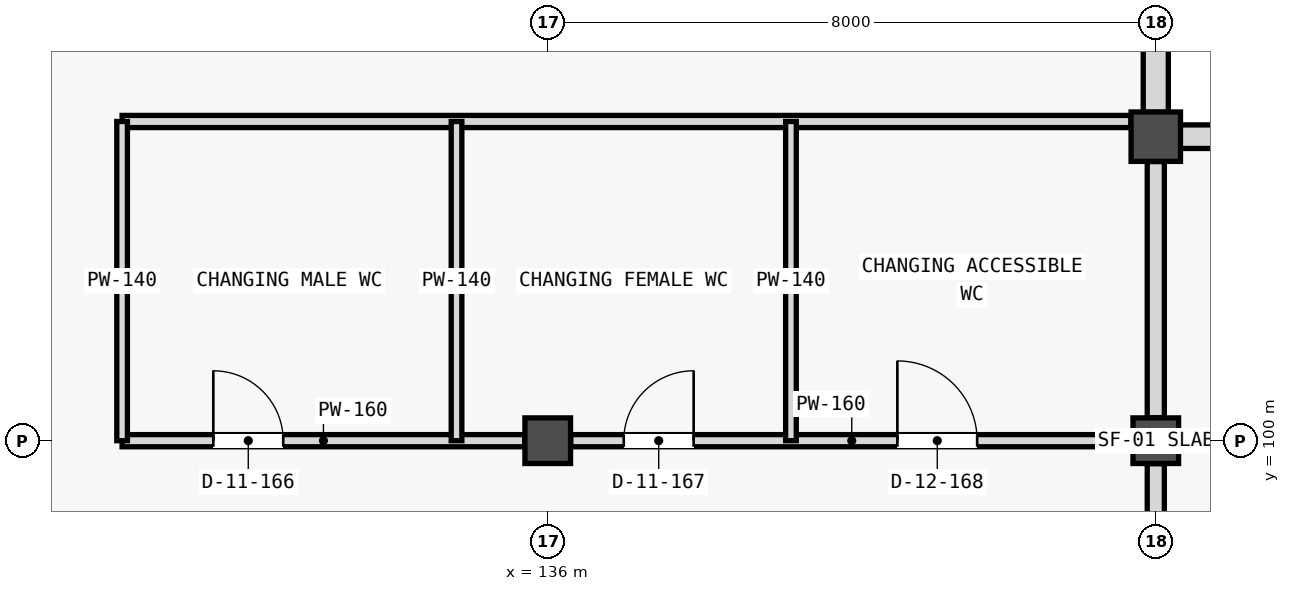
"""IFC4 building model, lengths in metres.
Left out: names, types, materials, properties, quantities, classifications, styles, units other than length and angle.
Written with IfcOpenShell. Run it as: python <this file> out.ifc"""

import sys

from ifc_helpers import new_model, si_unit, direction, frame, frame_2d, origin, origin_2d, place, context, subcontext, project, spatial, rectangle, extrude, element, fill, save


model = new_model("IFC4")
c1 = context("Model", 3, precision=1e-05, world=origin(), true_north=direction((0.0, 1.0)))
c2 = subcontext(c1, "Body", "Model", "MODEL_VIEW")
j1 = project(units=[si_unit("LENGTHUNIT", "METRE"), si_unit("PLANEANGLEUNIT", "RADIAN")], contexts=[c1])
p1 = place(None, origin())
s1 = spatial("IfcSite", under=j1, at=p1, CompositionType="ELEMENT")
p2 = place(p1, origin())
s2 = spatial("IfcBuilding", under=s1, at=p2, CompositionType="ELEMENT")
p3 = place(p2, origin())
s3 = spatial("IfcBuildingStorey", under=s2, at=p3, CompositionType="ELEMENT", Elevation=0.0)
for number, where, z_axis, x_axis in (
    (1, (136.0, 100.0, 0.0), (0.0, 0.0, 1.0), (1.0, 0.0, 0.0)),
    (2, (144.0, 100.0, 0.0), (0.0, 0.0, 1.0), (1.0, 0.0, 0.0)),
):
    element("IfcColumn", number, at=place(p3, frame(where, z_axis=z_axis, x_axis=x_axis)), inside=s3, PredefinedType="COLUMN", context=c2, shape_type="SweptSolid", body=[
        extrude(rectangle(XDim=0.6, YDim=0.6, at=origin_2d()), origin(), (0.0, 0.0, 1.0), 5.125),
    ])
p4 = place(p3, frame((144.0, 104.0, 0.0), z_axis=(0.0, 0.0, 1.0), x_axis=(1.0, 0.0, 0.0)))
e3 = element("IfcColumn", 3, at=p4, inside=s3, PredefinedType="COLUMN", context=c2, shape_type="SweptSolid", body=[
    extrude(rectangle(XDim=0.65, YDim=0.65, at=origin_2d()), origin(), (0.0, 0.0, 1.0), 5.125),
])
p5 = place(p3, frame((144.0, 104.321, 0.0), z_axis=(0.0, 0.0, 1.0), x_axis=(0.0, 1.0, 0.0)))
e4 = element("IfcWall", 4, at=p5, inside=s3, PredefinedType="STANDARD", context=c2, shape_type="SweptSolid", body=[
    extrude(rectangle(XDim=3.383, YDim=0.33, at=frame_2d((1.691, 0.0))), origin(), (0.0, 0.0, 1.0), 4.45),
])
p6 = place(p3, frame((144.321, 104.0, 0.0), z_axis=(0.0, 0.0, 1.0), x_axis=(1.0, 0.0, 0.0)))
e5 = element("IfcWall", 5, at=p6, inside=s3, PredefinedType="STANDARD", context=c2, shape_type="SweptSolid", body=[
    extrude(rectangle(XDim=7.358, YDim=0.31, at=frame_2d((3.679, 0.0))), origin(), (0.0, 0.0, 1.0), 4.25),
])
p7 = place(p6, frame((3.029, 0.0, 0.95)))
e6 = element("IfcOpeningElement", 6, at=p7, cuts=e5, PredefinedType="OPENING", context=c2, shape_type="SweptSolid", body=[
    extrude(rectangle(XDim=1.3, YDim=1.4, at=frame_2d((0.65, 0.7))), frame((0.0, 0.165, 0.0), z_axis=(0.0, -1.0, 0.0), x_axis=(1.0, 0.0, 0.0)), (0.0, 0.0, 1.0), 0.33),
])
for number, where, z_axis, x_axis in (
    (7, (144.0, 96.327, 0.0), (0.0, 0.0, 1.0), (0.0, 1.0, 0.0)),
    (8, (144.0, 100.302, 0.0), (0.0, 0.0, 1.0), (0.0, 1.0, 0.0)),
):
    element("IfcWall", number, at=place(p3, frame(where, z_axis=z_axis, x_axis=x_axis)), inside=s3, PredefinedType="STANDARD", context=c2, shape_type="SweptSolid", body=[
        extrude(rectangle(XDim=3.371, YDim=0.225, at=frame_2d((1.686, 0.0))), origin(), (0.0, 0.0, 1.0), 4.555),
    ])
p8 = place(p3, frame((130.4, 100.0, 0.0), z_axis=(0.0, 0.0, 1.0), x_axis=(1.0, 0.0, 0.0)))
e9 = element("IfcWall", 9, at=p8, inside=s3, PredefinedType="PARTITIONING", context=c2, shape_type="SweptSolid", body=[
    extrude(rectangle(XDim=5.298, YDim=0.16, at=frame_2d((2.649, 0.0))), origin(), (0.0, 0.0, 1.0), 4.355),
])
p9 = place(p8, frame((1.2, 0.0, 0.0)))
e10 = element("IfcOpeningElement", 10, at=p9, cuts=e9, PredefinedType="OPENING", context=c2, shape_type="SweptSolid", body=[
    extrude(rectangle(XDim=0.92, YDim=2.1, at=frame_2d((0.46, 1.05))), frame((0.0, 0.09, 0.0), z_axis=(0.0, -1.0, 0.0), x_axis=(1.0, 0.0, 0.0)), (0.0, 0.0, 1.0), 0.18),
])
p10 = place(p3, frame((136.302, 100.0, 0.0), z_axis=(0.0, 0.0, 1.0), x_axis=(1.0, 0.0, 0.0)))
e11 = element("IfcWall", 11, at=p10, inside=s3, PredefinedType="PARTITIONING", context=c2, shape_type="SweptSolid", body=[
    extrude(rectangle(XDim=7.396, YDim=0.16, at=frame_2d((3.698, 0.0))), origin(), (0.0, 0.0, 1.0), 4.355),
])
p11 = place(p10, frame((0.698, 0.0, 0.0)))
e12 = element("IfcOpeningElement", 12, at=p11, cuts=e11, PredefinedType="OPENING", context=c2, shape_type="SweptSolid", body=[
    extrude(rectangle(XDim=0.92, YDim=2.1, at=frame_2d((0.46, 1.05))), frame((0.0, 0.09, 0.0), z_axis=(0.0, -1.0, 0.0), x_axis=(1.0, 0.0, 0.0)), (0.0, 0.0, 1.0), 0.18),
])
p12 = place(p10, frame((4.298, 0.0, 0.0)))
e13 = element("IfcOpeningElement", 13, at=p12, cuts=e11, PredefinedType="OPENING", context=c2, shape_type="SweptSolid", body=[
    extrude(rectangle(XDim=1.05, YDim=2.15, at=frame_2d((0.525, 1.075))), frame((0.0, 0.09, 0.0), z_axis=(0.0, -1.0, 0.0), x_axis=(1.0, 0.0, 0.0)), (0.0, 0.0, 1.0), 0.18),
])
p13 = place(p3, frame((130.4, 104.2, 0.0), z_axis=(0.0, 0.0, 1.0), x_axis=(1.0, 0.0, 0.0)))
e14 = element("IfcWall", 14, at=p13, inside=s3, PredefinedType="PARTITIONING", context=c2, shape_type="SweptSolid", body=[
    extrude(rectangle(XDim=13.273, YDim=0.16, at=frame_2d((6.637, 0.0))), origin(), (0.0, 0.0, 1.0), 4.405),
])
for number, where, z_axis, x_axis in (
    (15, (130.4, 100.0, 0.0), (0.0, 0.0, 1.0), (0.0, 1.0, 0.0)),
    (16, (134.8, 100.0, 0.0), (0.0, 0.0, 1.0), (0.0, 1.0, 0.0)),
    (17, (139.2, 100.0, 0.0), (0.0, 0.0, 1.0), (0.0, 1.0, 0.0)),
):
    element("IfcWall", number, at=place(p3, frame(where, z_axis=z_axis, x_axis=x_axis)), inside=s3, PredefinedType="PLUMBINGWALL", context=c2, shape_type="SweptSolid", body=[
        extrude(rectangle(XDim=4.2, YDim=0.14, at=frame_2d((2.1, 0.0))), origin(), (0.0, 0.0, 1.0), 4.355),
    ])
p14 = place(p9, origin())
e18 = element("IfcDoor", 18, at=p14, inside=s3, OperationType="SINGLE_SWING_LEFT", PredefinedType="DOOR", context=c2, shape_type="SweptSolid", body=[
    extrude(rectangle(XDim=0.92, YDim=2.1, at=frame_2d((0.46, 1.05))), frame((0.0, 0.025, 0.0), z_axis=(0.0, -1.0, 0.0), x_axis=(1.0, 0.0, 0.0)), (0.0, 0.0, 1.0), 0.05),
])
fill(e10, e18)
p15 = place(p11, origin())
e19 = element("IfcDoor", 19, at=p15, inside=s3, OperationType="SINGLE_SWING_RIGHT", PredefinedType="DOOR", context=c2, shape_type="SweptSolid", body=[
    extrude(rectangle(XDim=0.92, YDim=2.1, at=frame_2d((0.46, 1.05))), frame((0.0, 0.025, 0.0), z_axis=(0.0, -1.0, 0.0), x_axis=(1.0, 0.0, 0.0)), (0.0, 0.0, 1.0), 0.05),
])
fill(e12, e19)
p16 = place(p12, origin())
e20 = element("IfcDoor", 20, at=p16, inside=s3, OperationType="SINGLE_SWING_LEFT", PredefinedType="DOOR", context=c2, shape_type="SweptSolid", body=[
    extrude(rectangle(XDim=1.05, YDim=2.15, at=frame_2d((0.525, 1.075))), frame((0.0, 0.025, 0.0), z_axis=(0.0, -1.0, 0.0), x_axis=(1.0, 0.0, 0.0)), (0.0, 0.0, 1.0), 0.05),
])
fill(e13, e20)
save(model, sys.argv[1])
